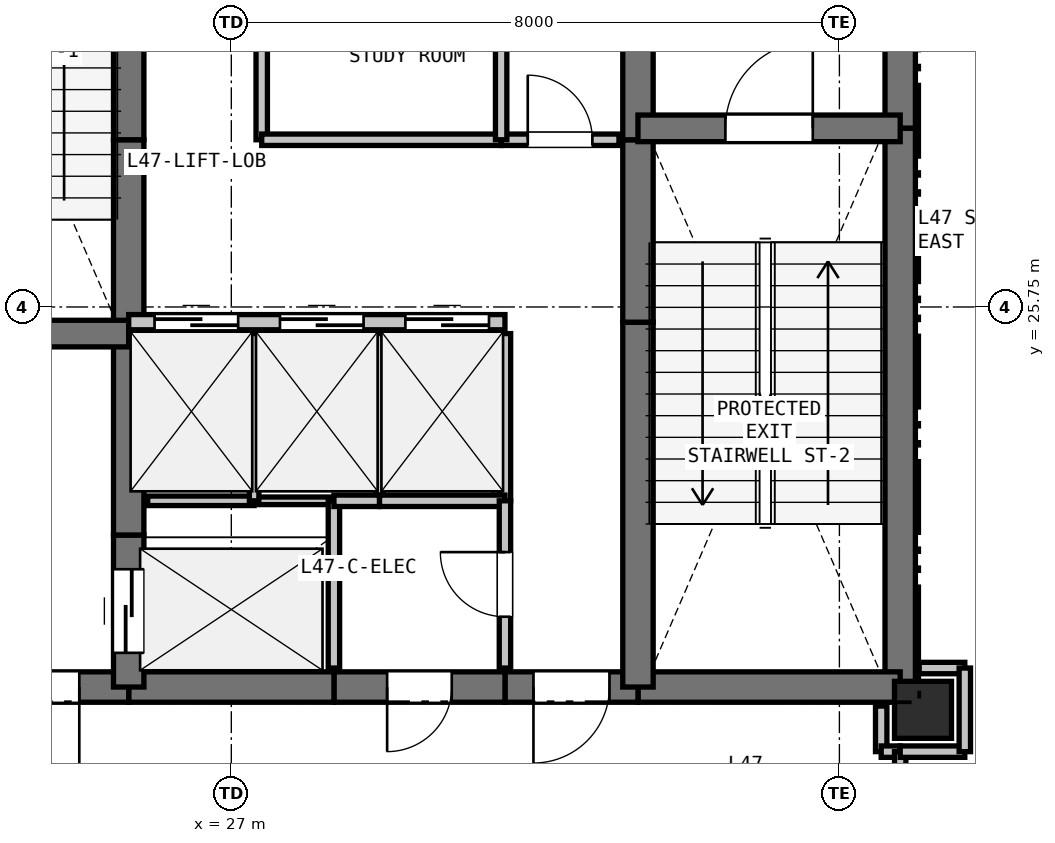
"""IFC4 building model, lengths in metres.
Left out: names, types, materials, properties, quantities, classifications, styles, units other than length and angle.
Written with IfcOpenShell. Run it as: python <this file> out.ifc"""

import sys

from ifc_helpers import new_model, si_unit, direction, frame, frame_2d, origin, origin_2d, place, context, subcontext, project, spatial, rectangle, extrude, element, fill, save


model = new_model("IFC4")
c1 = context("Model", 3, precision=1e-05, world=origin(), true_north=direction((0.0, 1.0)))
c2 = subcontext(c1, "Body", "Model", "MODEL_VIEW")
j1 = project(units=[si_unit("LENGTHUNIT", "METRE"), si_unit("PLANEANGLEUNIT", "RADIAN")], contexts=[c1])
p1 = place(None, origin())
s1 = spatial("IfcSite", under=j1, at=p1, CompositionType="ELEMENT")
p2 = place(p1, origin())
s2 = spatial("IfcBuilding", under=s1, at=p2, CompositionType="ELEMENT")
p3 = place(p2, frame((0.0, 0.0, 170.7)))
s3 = spatial("IfcBuildingStorey", under=s2, at=p3, CompositionType="ELEMENT", Elevation=170.7)
p4 = place(p3, frame((36.1, 20.45, 0.0), z_axis=(0.0, 0.0, 1.0), x_axis=(1.0, 0.0, 0.0)))
e1 = element("IfcColumn", 1, at=p4, inside=s3, PredefinedType="COLUMN", context=c2, shape_type="SweptSolid", body=[
    extrude(rectangle(XDim=0.75, YDim=0.75, at=origin_2d()), origin(), (0.0, 0.0, 1.0), 4.8),
])
p5 = place(p3, frame((35.8, 32.75, 0.0), z_axis=(0.0, 0.0, 1.0), x_axis=(0.0, -1.0, 0.0)))
e2 = element("IfcWall", 2, at=p5, inside=s3, PredefinedType="SHEAR", context=c2, shape_type="SweptSolid", body=[
    extrude(rectangle(XDim=4.65, YDim=0.4, at=frame_2d((2.325, 0.0))), origin(), (0.0, 0.0, 1.0), 4.57),
])
p6 = place(p3, frame((35.8, 28.1, 0.0), z_axis=(0.0, 0.0, 1.0), x_axis=(0.0, -1.0, 0.0)))
e3 = element("IfcWall", 3, at=p6, inside=s3, PredefinedType="SHEAR", context=c2, shape_type="SweptSolid", body=[
    extrude(rectangle(XDim=7.35, YDim=0.4, at=frame_2d((3.675, 0.0))), origin(), (0.0, 0.0, 1.0), 4.57),
])
p7 = place(p3, frame((35.8, 20.75, 0.0), z_axis=(0.0, 0.0, 1.0), x_axis=(-1.0, 0.0, 0.0)))
e4 = element("IfcWall", 4, at=p7, inside=s3, PredefinedType="SHEAR", context=c2, shape_type="SweptSolid", body=[
    extrude(rectangle(XDim=3.45, YDim=0.4, at=frame_2d((1.725, 0.0))), origin(), (0.0, 0.0, 1.0), 4.57),
])
p8 = place(p3, frame((32.35, 20.75, 0.0), z_axis=(0.0, 0.0, 1.0), x_axis=(-1.0, 0.0, 0.0)))
e5 = element("IfcWall", 5, at=p8, inside=s3, PredefinedType="SHEAR", context=c2, shape_type="SweptSolid", body=[
    extrude(rectangle(XDim=1.75, YDim=0.4, at=frame_2d((0.875, 0.0))), origin(), (0.0, 0.0, 1.0), 4.57),
])
p9 = place(p8, frame((0.375, 0.0, 0.0)))
e6 = element("IfcOpeningElement", 6, at=p9, cuts=e5, PredefinedType="OPENING", context=c2, shape_type="SweptSolid", body=[
    extrude(rectangle(XDim=1.0, YDim=2.15, at=frame_2d((0.5, 1.075))), frame((0.0, 0.21, 0.0), z_axis=(0.0, -1.0, 0.0), x_axis=(1.0, 0.0, 0.0)), (0.0, 0.0, 1.0), 0.42),
])
p10 = place(p3, frame((30.6, 20.75, 0.0), z_axis=(0.0, 0.0, 1.0), x_axis=(-1.0, 0.0, 0.0)))
e7 = element("IfcWall", 7, at=p10, inside=s3, PredefinedType="SHEAR", context=c2, shape_type="SweptSolid", body=[
    extrude(rectangle(XDim=2.25, YDim=0.4, at=frame_2d((1.125, 0.0))), origin(), (0.0, 0.0, 1.0), 4.57),
])
p11 = place(p10, frame((0.7, 0.0, 0.0)))
e8 = element("IfcOpeningElement", 8, at=p11, cuts=e7, PredefinedType="OPENING", context=c2, shape_type="SweptSolid", body=[
    extrude(rectangle(XDim=0.85, YDim=2.1, at=frame_2d((0.425, 1.05))), frame((0.0, 0.21, 0.0), z_axis=(0.0, -1.0, 0.0), x_axis=(1.0, 0.0, 0.0)), (0.0, 0.0, 1.0), 0.42),
])
p12 = place(p3, frame((28.35, 20.75, 0.0), z_axis=(0.0, 0.0, 1.0), x_axis=(-1.0, 0.0, 0.0)))
e9 = element("IfcWall", 9, at=p12, inside=s3, PredefinedType="SHEAR", context=c2, shape_type="SweptSolid", body=[
    extrude(rectangle(XDim=2.7, YDim=0.4, at=frame_2d((1.35, 0.0))), origin(), (0.0, 0.0, 1.0), 4.57),
])
p13 = place(p3, frame((25.65, 20.75, 0.0), z_axis=(0.0, 0.0, 1.0), x_axis=(-1.0, 0.0, 0.0)))
e10 = element("IfcWall", 10, at=p13, inside=s3, PredefinedType="SHEAR", context=c2, shape_type="SweptSolid", body=[
    extrude(rectangle(XDim=3.45, YDim=0.4, at=frame_2d((1.725, 0.0))), origin(), (0.0, 0.0, 1.0), 4.57),
])
p14 = place(p13, frame((0.65, 0.0, 0.0)))
e11 = element("IfcOpeningElement", 11, at=p14, cuts=e10, PredefinedType="OPENING", context=c2, shape_type="SweptSolid", body=[
    extrude(rectangle(XDim=1.15, YDim=2.15, at=frame_2d((0.575, 1.075))), frame((0.0, 0.21, 0.0), z_axis=(0.0, -1.0, 0.0), x_axis=(1.0, 0.0, 0.0)), (0.0, 0.0, 1.0), 0.42),
])
p15 = place(p3, frame((25.65, 20.75, 0.0), z_axis=(0.0, 0.0, 1.0), x_axis=(0.0, 1.0, 0.0)))
e12 = element("IfcWall", 12, at=p15, inside=s3, PredefinedType="SHEAR", context=c2, shape_type="SweptSolid", body=[
    extrude(rectangle(XDim=2.0, YDim=0.4, at=frame_2d((1.0, 0.0))), origin(), (0.0, 0.0, 1.0), 4.57),
])
p16 = place(p15, frame((0.45, 0.0, 0.0)))
e13 = element("IfcOpeningElement", 13, at=p16, cuts=e12, PredefinedType="OPENING", context=c2, shape_type="SweptSolid", body=[
    extrude(rectangle(XDim=1.1, YDim=2.15, at=frame_2d((0.55, 1.075))), frame((0.0, 0.21, 0.0), z_axis=(0.0, -1.0, 0.0), x_axis=(1.0, 0.0, 0.0)), (0.0, 0.0, 1.0), 0.42),
])
p17 = place(p3, frame((25.65, 22.75, 0.0), z_axis=(0.0, 0.0, 1.0), x_axis=(0.0, 1.0, 0.0)))
e14 = element("IfcWall", 14, at=p17, inside=s3, PredefinedType="SHEAR", context=c2, shape_type="SweptSolid", body=[
    extrude(rectangle(XDim=2.8, YDim=0.4, at=frame_2d((1.4, 0.0))), origin(), (0.0, 0.0, 1.0), 4.57),
])
p18 = place(p3, frame((25.65, 25.55, 0.0), z_axis=(0.0, 0.0, 1.0), x_axis=(0.0, 1.0, 0.0)))
e15 = element("IfcWall", 15, at=p18, inside=s3, PredefinedType="SHEAR", context=c2, shape_type="SweptSolid", body=[
    extrude(rectangle(XDim=2.4, YDim=0.4, at=frame_2d((1.2, 0.0))), origin(), (0.0, 0.0, 1.0), 4.57),
])
for number, where, z_axis, x_axis in (
    (16, (25.65, 27.95, 0.0), (0.0, 0.0, 1.0), (0.0, 1.0, 0.0)),
    (17, (32.35, 20.75, 0.0), (0.0, 0.0, 1.0), (0.0, 1.0, 0.0)),
):
    element("IfcWall", number, at=place(p3, frame(where, z_axis=z_axis, x_axis=x_axis)), inside=s3, PredefinedType="SHEAR", context=c2, shape_type="SweptSolid", body=[
        extrude(rectangle(XDim=4.8, YDim=0.4, at=frame_2d((2.4, 0.0))), origin(), (0.0, 0.0, 1.0), 4.57),
    ])
p19 = place(p3, frame((32.35, 25.55, 0.0), z_axis=(0.0, 0.0, 1.0), x_axis=(0.0, 1.0, 0.0)))
e18 = element("IfcWall", 18, at=p19, inside=s3, PredefinedType="SHEAR", context=c2, shape_type="SweptSolid", body=[
    extrude(rectangle(XDim=2.4, YDim=0.4, at=frame_2d((1.2, 0.0))), origin(), (0.0, 0.0, 1.0), 4.57),
])
p20 = place(p3, frame((32.35, 27.95, 0.0), z_axis=(0.0, 0.0, 1.0), x_axis=(0.0, 1.0, 0.0)))
e19 = element("IfcWall", 19, at=p20, inside=s3, PredefinedType="SHEAR", context=c2, shape_type="SweptSolid", body=[
    extrude(rectangle(XDim=2.8, YDim=0.4, at=frame_2d((1.4, 0.0))), origin(), (0.0, 0.0, 1.0), 4.57),
])
p21 = place(p3, frame((22.2, 25.4, 0.0), z_axis=(0.0, 0.0, 1.0), x_axis=(1.0, 0.0, 0.0)))
e20 = element("IfcWall", 20, at=p21, inside=s3, PredefinedType="SHEAR", context=c2, shape_type="SweptSolid", body=[
    extrude(rectangle(XDim=3.45, YDim=0.35, at=frame_2d((1.725, 0.0))), origin(), (0.0, 0.0, 1.0), 4.57),
])
p22 = place(p21, frame((1.15, 0.0, 0.0)))
e21 = element("IfcOpeningElement", 21, at=p22, cuts=e20, PredefinedType="OPENING", context=c2, shape_type="SweptSolid", body=[
    extrude(rectangle(XDim=1.15, YDim=2.15, at=frame_2d((0.575, 1.075))), frame((0.0, 0.185, 0.0), z_axis=(0.0, -1.0, 0.0), x_axis=(1.0, 0.0, 0.0)), (0.0, 0.0, 1.0), 0.37),
])
p23 = place(p3, frame((32.35, 28.1, 0.0), z_axis=(0.0, 0.0, 1.0), x_axis=(1.0, 0.0, 0.0)))
e22 = element("IfcWall", 22, at=p23, inside=s3, PredefinedType="SHEAR", context=c2, shape_type="SweptSolid", body=[
    extrude(rectangle(XDim=3.45, YDim=0.35, at=frame_2d((1.725, 0.0))), origin(), (0.0, 0.0, 1.0), 4.57),
])
p24 = place(p23, frame((1.15, 0.0, 0.0)))
e23 = element("IfcOpeningElement", 23, at=p24, cuts=e22, PredefinedType="OPENING", context=c2, shape_type="SweptSolid", body=[
    extrude(rectangle(XDim=1.15, YDim=2.15, at=frame_2d((0.575, 1.075))), frame((0.0, 0.185, 0.0), z_axis=(0.0, -1.0, 0.0), x_axis=(1.0, 0.0, 0.0)), (0.0, 0.0, 1.0), 0.37),
])
p25 = place(p3, frame((25.65, 25.55, 0.0), z_axis=(0.0, 0.0, 1.0), x_axis=(1.0, 0.0, 0.0)))
e24 = element("IfcWall", 24, at=p25, inside=s3, PredefinedType="PARTITIONING", context=c2, shape_type="SweptSolid", body=[
    extrude(rectangle(XDim=4.95, YDim=0.2, at=frame_2d((2.475, 0.0))), origin(), (0.0, 0.0, 1.0), 4.57),
])
p26 = place(p25, frame((0.34, 0.0, 0.0)))
e25 = element("IfcOpeningElement", 25, at=p26, cuts=e24, PredefinedType="OPENING", context=c2, shape_type="SweptSolid", body=[
    extrude(rectangle(XDim=1.1, YDim=2.15, at=frame_2d((0.55, 1.075))), frame((0.0, 0.11, 0.0), z_axis=(0.0, -1.0, 0.0), x_axis=(1.0, 0.0, 0.0)), (0.0, 0.0, 1.0), 0.22),
])
p27 = place(p25, frame((1.99, 0.0, 0.0)))
e26 = element("IfcOpeningElement", 26, at=p27, cuts=e24, PredefinedType="OPENING", context=c2, shape_type="SweptSolid", body=[
    extrude(rectangle(XDim=1.1, YDim=2.15, at=frame_2d((0.55, 1.075))), frame((0.0, 0.11, 0.0), z_axis=(0.0, -1.0, 0.0), x_axis=(1.0, 0.0, 0.0)), (0.0, 0.0, 1.0), 0.22),
])
p28 = place(p25, frame((3.64, 0.0, 0.0)))
e27 = element("IfcOpeningElement", 27, at=p28, cuts=e24, PredefinedType="OPENING", context=c2, shape_type="SweptSolid", body=[
    extrude(rectangle(XDim=1.1, YDim=2.15, at=frame_2d((0.55, 1.075))), frame((0.0, 0.11, 0.0), z_axis=(0.0, -1.0, 0.0), x_axis=(1.0, 0.0, 0.0)), (0.0, 0.0, 1.0), 0.22),
])
p29 = place(p3, frame((25.9, 23.2, 0.0), z_axis=(0.0, 0.0, 1.0), x_axis=(1.0, 0.0, 0.0)))
e28 = element("IfcWall", 28, at=p29, inside=s3, PredefinedType="PARTITIONING", context=c2, shape_type="SweptSolid", body=[
    extrude(rectangle(XDim=1.4, YDim=0.125, at=frame_2d((0.7, 0.0))), origin(), (0.0, 0.0, 1.0), 4.57),
])
p30 = place(p3, frame((27.3, 23.2, 0.0), z_axis=(0.0, 0.0, 1.0), x_axis=(1.0, 0.0, 0.0)))
e29 = element("IfcWall", 29, at=p30, inside=s3, PredefinedType="PARTITIONING", context=c2, shape_type="SweptSolid", body=[
    extrude(rectangle(XDim=1.05, YDim=0.1, at=frame_2d((0.525, 0.0))), origin(), (0.0, 0.0, 1.0), 4.57),
])
p31 = place(p3, frame((28.35, 23.2, 0.0), z_axis=(0.0, 0.0, 1.0), x_axis=(0.0, -1.0, 0.0)))
e30 = element("IfcWall", 30, at=p31, inside=s3, PredefinedType="PARTITIONING", context=c2, shape_type="SweptSolid", body=[
    extrude(rectangle(XDim=2.2, YDim=0.15, at=frame_2d((1.1, 0.0))), origin(), (0.0, 0.0, 1.0), 4.57),
])
p32 = place(p3, frame((27.3, 25.4, 0.0), z_axis=(0.0, 0.0, 1.0), x_axis=(0.0, -1.0, 0.0)))
e31 = element("IfcWall", 31, at=p32, inside=s3, PredefinedType="PARTITIONING", context=c2, shape_type="SweptSolid", body=[
    extrude(rectangle(XDim=2.2, YDim=0.125, at=frame_2d((1.1, 0.0))), origin(), (0.0, 0.0, 1.0), 4.57),
])
p33 = place(p3, frame((28.95, 25.4, 0.0), z_axis=(0.0, 0.0, 1.0), x_axis=(0.0, -1.0, 0.0)))
e32 = element("IfcWall", 32, at=p33, inside=s3, PredefinedType="PARTITIONING", context=c2, shape_type="SweptSolid", body=[
    extrude(rectangle(XDim=2.2, YDim=0.1, at=frame_2d((1.1, 0.0))), origin(), (0.0, 0.0, 1.0), 4.57),
])
p34 = place(p3, frame((28.95, 23.2, 0.0), z_axis=(0.0, 0.0, 1.0), x_axis=(-1.0, 0.0, 0.0)))
e33 = element("IfcWall", 33, at=p34, inside=s3, PredefinedType="PARTITIONING", context=c2, shape_type="SweptSolid", body=[
    extrude(rectangle(XDim=0.6, YDim=0.15, at=frame_2d((0.3, 0.0))), origin(), (0.0, 0.0, 1.0), 4.57),
])
p35 = place(p3, frame((30.6, 25.4, 0.0), z_axis=(0.0, 0.0, 1.0), x_axis=(0.0, -1.0, 0.0)))
e34 = element("IfcWall", 34, at=p35, inside=s3, PredefinedType="PARTITIONING", context=c2, shape_type="SweptSolid", body=[
    extrude(rectangle(XDim=2.2, YDim=0.15, at=frame_2d((1.1, 0.0))), origin(), (0.0, 0.0, 1.0), 4.57),
])
p36 = place(p3, frame((30.6, 23.2, 0.0), z_axis=(0.0, 0.0, 1.0), x_axis=(-1.0, 0.0, 0.0)))
e35 = element("IfcWall", 35, at=p36, inside=s3, PredefinedType="PARTITIONING", context=c2, shape_type="SweptSolid", body=[
    extrude(rectangle(XDim=1.65, YDim=0.15, at=frame_2d((0.825, 0.0))), origin(), (0.0, 0.0, 1.0), 4.57),
])
p37 = place(p3, frame((30.6, 21.0, 0.0), z_axis=(0.0, 0.0, 1.0), x_axis=(0.0, 1.0, 0.0)))
e36 = element("IfcWall", 36, at=p37, inside=s3, PredefinedType="PARTITIONING", context=c2, shape_type="SweptSolid", body=[
    extrude(rectangle(XDim=2.2, YDim=0.15, at=frame_2d((1.1, 0.0))), origin(), (0.0, 0.0, 1.0), 4.57),
])
p38 = place(p37, frame((0.675, 0.0, 0.0)))
e37 = element("IfcOpeningElement", 37, at=p38, cuts=e36, PredefinedType="OPENING", context=c2, shape_type="SweptSolid", body=[
    extrude(rectangle(XDim=0.85, YDim=2.1, at=frame_2d((0.425, 1.05))), frame((0.0, 0.085, 0.0), z_axis=(0.0, -1.0, 0.0), x_axis=(1.0, 0.0, 0.0)), (0.0, 0.0, 1.0), 0.17),
])
p39 = place(p3, frame((27.4, 32.5, 0.0), z_axis=(0.0, 0.0, 1.0), x_axis=(0.0, -1.0, 0.0)))
e38 = element("IfcWall", 38, at=p39, inside=s3, PredefinedType="PARTITIONING", context=c2, shape_type="SweptSolid", body=[
    extrude(rectangle(XDim=4.55, YDim=0.15, at=frame_2d((2.275, 0.0))), origin(), (0.0, 0.0, 1.0), 4.57),
])
p40 = place(p39, frame((1.775, 0.0, 0.0)))
e39 = element("IfcOpeningElement", 39, at=p40, cuts=e38, PredefinedType="OPENING", context=c2, shape_type="SweptSolid", body=[
    extrude(rectangle(XDim=1.0, YDim=2.15, at=frame_2d((0.5, 1.075))), frame((0.0, 0.085, 0.0), z_axis=(0.0, -1.0, 0.0), x_axis=(1.0, 0.0, 0.0)), (0.0, 0.0, 1.0), 0.17),
])
p41 = place(p3, frame((27.4, 27.95, 0.0), z_axis=(0.0, 0.0, 1.0), x_axis=(1.0, 0.0, 0.0)))
e40 = element("IfcWall", 40, at=p41, inside=s3, PredefinedType="PARTITIONING", context=c2, shape_type="SweptSolid", body=[
    extrude(rectangle(XDim=3.15, YDim=0.15, at=frame_2d((1.575, 0.0))), origin(), (0.0, 0.0, 1.0), 4.57),
])
p42 = place(p3, frame((30.55, 27.95, 0.0), z_axis=(0.0, 0.0, 1.0), x_axis=(1.0, 0.0, 0.0)))
e41 = element("IfcWall", 41, at=p42, inside=s3, PredefinedType="PARTITIONING", context=c2, shape_type="SweptSolid", body=[
    extrude(rectangle(XDim=1.55, YDim=0.15, at=frame_2d((0.775, 0.0))), origin(), (0.0, 0.0, 1.0), 4.57),
])
p43 = place(p42, frame((0.35, 0.0, 0.0)))
e42 = element("IfcOpeningElement", 42, at=p43, cuts=e41, PredefinedType="OPENING", context=c2, shape_type="SweptSolid", body=[
    extrude(rectangle(XDim=0.85, YDim=2.1, at=frame_2d((0.425, 1.05))), frame((0.0, 0.085, 0.0), z_axis=(0.0, -1.0, 0.0), x_axis=(1.0, 0.0, 0.0)), (0.0, 0.0, 1.0), 0.17),
])
p44 = place(p3, frame((35.55, 20.5, 0.0), z_axis=(0.0, 0.0, 1.0), x_axis=(0.0, -1.0, 0.0)))
e43 = element("IfcWall", 43, at=p44, inside=s3, PredefinedType="PARTITIONING", context=c2, shape_type="SweptSolid", body=[
    extrude(rectangle(XDim=0.6, YDim=0.15, at=frame_2d((0.3, 0.0))), origin(), (0.0, 0.0, 1.0), 4.095),
])
p45 = place(p3, frame((35.55, 19.9, 0.0), z_axis=(0.0, 0.0, 1.0), x_axis=(1.0, 0.0, 0.0)))
e44 = element("IfcWall", 44, at=p45, inside=s3, PredefinedType="PARTITIONING", context=c2, shape_type="SweptSolid", body=[
    extrude(rectangle(XDim=0.25, YDim=0.15, at=frame_2d((0.125, 0.0))), origin(), (0.0, 0.0, 1.0), 4.57),
])
p46 = place(p3, frame((35.8, 19.9, 0.0), z_axis=(0.0, 0.0, 1.0), x_axis=(0.0, -1.0, 0.0)))
e45 = element("IfcWall", 45, at=p46, inside=s3, PredefinedType="PARTITIONING", context=c2, shape_type="SweptSolid", body=[
    extrude(rectangle(XDim=1.5, YDim=0.15, at=frame_2d((0.75, 0.0))), origin(), (0.0, 0.0, 1.0), 3.205),
])
p47 = place(p46, frame((0.25, 0.0, 0.0)))
e46 = element("IfcOpeningElement", 46, at=p47, cuts=e45, PredefinedType="OPENING", context=c2, shape_type="SweptSolid", body=[
    extrude(rectangle(XDim=1.0, YDim=2.15, at=frame_2d((0.5, 1.075))), frame((0.0, 0.085, 0.0), z_axis=(0.0, -1.0, 0.0), x_axis=(1.0, 0.0, 0.0)), (0.0, 0.0, 1.0), 0.17),
])
p48 = place(p3, frame((36.65, 21.0, 0.0), z_axis=(0.0, 0.0, 1.0), x_axis=(-1.0, 0.0, 0.0)))
e47 = element("IfcWall", 47, at=p48, inside=s3, PredefinedType="PARTITIONING", context=c2, shape_type="SweptSolid", body=[
    extrude(rectangle(XDim=0.6, YDim=0.15, at=frame_2d((0.3, 0.0))), origin(), (0.0, 0.0, 1.0), 4.095),
])
p49 = place(p3, frame((35.8, 19.9, 0.0), z_axis=(0.0, 0.0, 1.0), x_axis=(1.0, 0.0, 0.0)))
e48 = element("IfcWall", 48, at=p49, inside=s3, PredefinedType="PARTITIONING", context=c2, shape_type="SweptSolid", body=[
    extrude(rectangle(XDim=0.85, YDim=0.15, at=frame_2d((0.425, 0.0))), origin(), (0.0, 0.0, 1.0), 4.57),
])
p50 = place(p3, frame((36.65, 19.9, 0.0), z_axis=(0.0, 0.0, 1.0), x_axis=(0.0, 1.0, 0.0)))
e49 = element("IfcWall", 49, at=p50, inside=s3, PredefinedType="PARTITIONING", context=c2, shape_type="SweptSolid", body=[
    extrude(rectangle(XDim=1.1, YDim=0.15, at=frame_2d((0.55, 0.0))), origin(), (0.0, 0.0, 1.0), 4.57),
])
p51 = place(p3, frame((30.55, 30.3, 0.0), z_axis=(0.0, 0.0, 1.0), x_axis=(0.0, -1.0, 0.0)))
e50 = element("IfcWall", 50, at=p51, inside=s3, PredefinedType="PARTITIONING", context=c2, shape_type="SweptSolid", body=[
    extrude(rectangle(XDim=2.35, YDim=0.15, at=frame_2d((1.175, 0.0))), origin(), (0.0, 0.0, 1.0), 4.57),
])
p52 = place(p26, origin())
e51 = element("IfcDoor", 51, at=p52, inside=s3, OperationType="SLIDING_TO_LEFT", PredefinedType="DOOR", context=c2, shape_type="SweptSolid", body=[
    extrude(rectangle(XDim=1.1, YDim=2.15, at=frame_2d((0.55, 1.075))), frame((0.0, 0.025, 0.0), z_axis=(0.0, -1.0, 0.0), x_axis=(1.0, 0.0, 0.0)), (0.0, 0.0, 1.0), 0.05),
])
fill(e25, e51)
p53 = place(p27, origin())
e52 = element("IfcDoor", 52, at=p53, inside=s3, OperationType="SLIDING_TO_LEFT", PredefinedType="DOOR", context=c2, shape_type="SweptSolid", body=[
    extrude(rectangle(XDim=1.1, YDim=2.15, at=frame_2d((0.55, 1.075))), frame((0.0, 0.025, 0.0), z_axis=(0.0, -1.0, 0.0), x_axis=(1.0, 0.0, 0.0)), (0.0, 0.0, 1.0), 0.05),
])
fill(e26, e52)
p54 = place(p28, origin())
e53 = element("IfcDoor", 53, at=p54, inside=s3, OperationType="SLIDING_TO_LEFT", PredefinedType="DOOR", context=c2, shape_type="SweptSolid", body=[
    extrude(rectangle(XDim=1.1, YDim=2.15, at=frame_2d((0.55, 1.075))), frame((0.0, 0.025, 0.0), z_axis=(0.0, -1.0, 0.0), x_axis=(1.0, 0.0, 0.0)), (0.0, 0.0, 1.0), 0.05),
])
fill(e27, e53)
p55 = place(p9, origin())
e54 = element("IfcDoor", 54, at=p55, inside=s3, OperationType="SINGLE_SWING_RIGHT", PredefinedType="DOOR", context=c2, shape_type="SweptSolid", body=[
    extrude(rectangle(XDim=1.0, YDim=2.15, at=frame_2d((0.5, 1.075))), frame((0.0, 0.025, 0.0), z_axis=(0.0, -1.0, 0.0), x_axis=(1.0, 0.0, 0.0)), (0.0, 0.0, 1.0), 0.05),
])
fill(e6, e54)
p56 = place(p16, origin())
e55 = element("IfcDoor", 55, at=p56, inside=s3, OperationType="SLIDING_TO_LEFT", PredefinedType="DOOR", context=c2, shape_type="SweptSolid", body=[
    extrude(rectangle(XDim=1.1, YDim=2.15, at=frame_2d((0.55, 1.075))), frame((0.0, 0.025, 0.0), z_axis=(0.0, -1.0, 0.0), x_axis=(1.0, 0.0, 0.0)), (0.0, 0.0, 1.0), 0.05),
])
fill(e13, e55)
p57 = place(p24, origin())
e56 = element("IfcDoor", 56, at=p57, inside=s3, OperationType="SINGLE_SWING_RIGHT", PredefinedType="DOOR", context=c2, shape_type="SweptSolid", body=[
    extrude(rectangle(XDim=1.15, YDim=2.15, at=frame_2d((0.575, 1.075))), frame((0.0, 0.025, 0.0), z_axis=(0.0, -1.0, 0.0), x_axis=(1.0, 0.0, 0.0)), (0.0, 0.0, 1.0), 0.05),
])
fill(e23, e56)
p58 = place(p14, origin())
e57 = element("IfcDoor", 57, at=p58, inside=s3, OperationType="SINGLE_SWING_LEFT", PredefinedType="DOOR", context=c2, shape_type="SweptSolid", body=[
    extrude(rectangle(XDim=1.15, YDim=2.15, at=frame_2d((0.575, 1.075))), frame((0.0, 0.025, 0.0), z_axis=(0.0, -1.0, 0.0), x_axis=(1.0, 0.0, 0.0)), (0.0, 0.0, 1.0), 0.05),
])
fill(e11, e57)
p59 = place(p43, origin())
e58 = element("IfcDoor", 58, at=p59, inside=s3, OperationType="SINGLE_SWING_LEFT", PredefinedType="DOOR", context=c2, shape_type="SweptSolid", body=[
    extrude(rectangle(XDim=0.85, YDim=2.1, at=frame_2d((0.425, 1.05))), frame((0.0, 0.025, 0.0), z_axis=(0.0, -1.0, 0.0), x_axis=(1.0, 0.0, 0.0)), (0.0, 0.0, 1.0), 0.05),
])
fill(e42, e58)
p60 = place(p38, origin())
e59 = element("IfcDoor", 59, at=p60, inside=s3, OperationType="SINGLE_SWING_RIGHT", PredefinedType="DOOR", context=c2, shape_type="SweptSolid", body=[
    extrude(rectangle(XDim=0.85, YDim=2.1, at=frame_2d((0.425, 1.05))), frame((0.0, 0.025, 0.0), z_axis=(0.0, -1.0, 0.0), x_axis=(1.0, 0.0, 0.0)), (0.0, 0.0, 1.0), 0.05),
])
fill(e37, e59)
p61 = place(p11, origin())
e60 = element("IfcDoor", 60, at=p61, inside=s3, OperationType="SINGLE_SWING_RIGHT", PredefinedType="DOOR", context=c2, shape_type="SweptSolid", body=[
    extrude(rectangle(XDim=0.85, YDim=2.1, at=frame_2d((0.425, 1.05))), frame((0.0, 0.025, 0.0), z_axis=(0.0, -1.0, 0.0), x_axis=(1.0, 0.0, 0.0)), (0.0, 0.0, 1.0), 0.05),
])
fill(e8, e60)
save(model, sys.argv[1])
